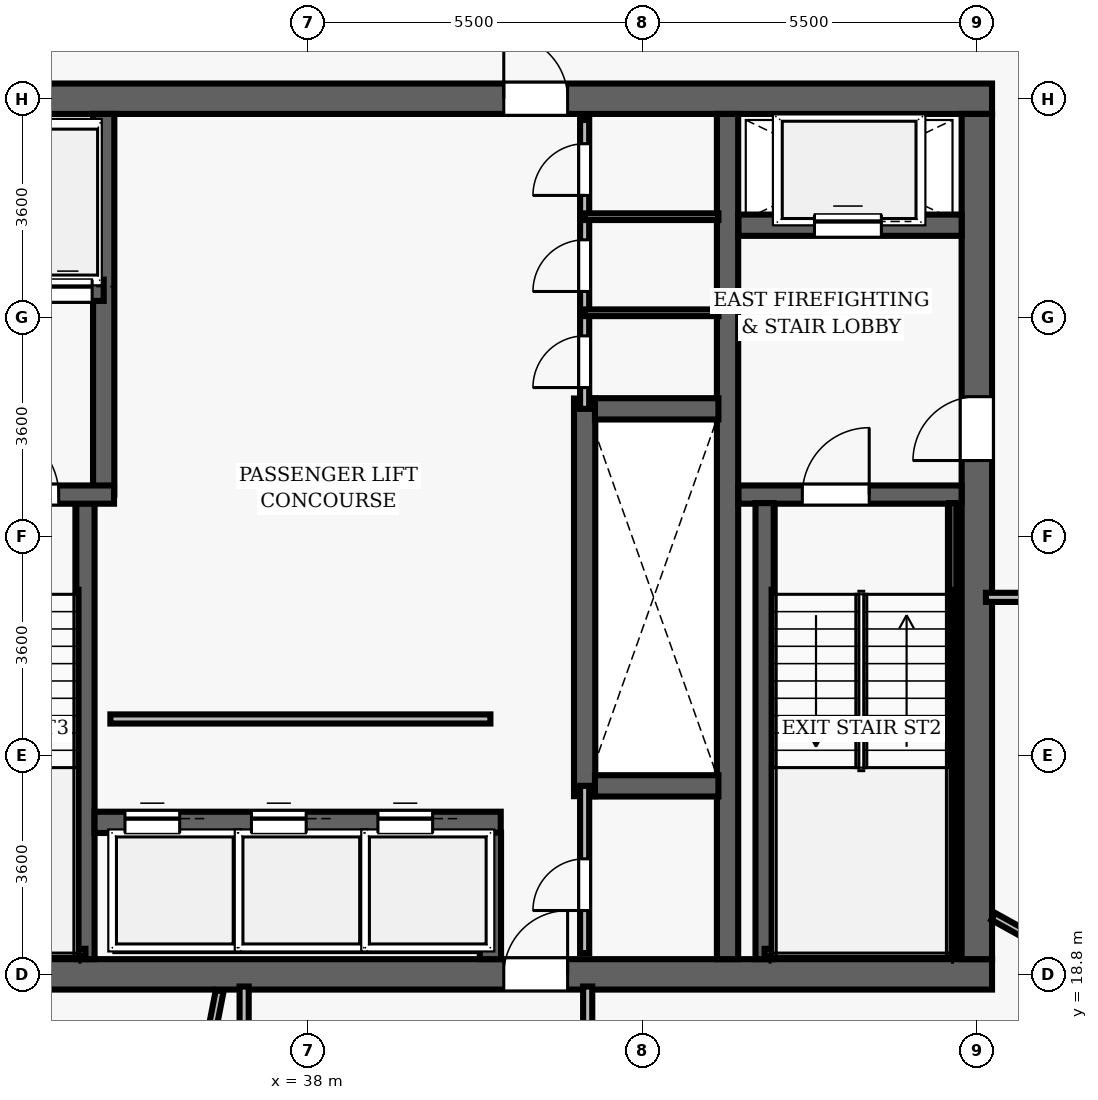
"""IFC4 building model, lengths in metres.
Left out: names, types, materials, properties, quantities, classifications, styles, units other than length and angle.
Written with IfcOpenShell. Run it as: python <this file> out.ifc"""

import sys

from ifc_helpers import new_model, si_unit, direction, frame, frame_2d, origin, place, context, subcontext, project, spatial, rectangle, extrude, element, fill, save


model = new_model("IFC4")
c1 = context("Model", 3, precision=1e-05, world=origin(), true_north=direction((0.0, 1.0)))
c2 = subcontext(c1, "Body", "Model", "MODEL_VIEW")
j1 = project(units=[si_unit("LENGTHUNIT", "METRE"), si_unit("PLANEANGLEUNIT", "RADIAN")], contexts=[c1])
p1 = place(None, origin())
s1 = spatial("IfcSite", under=j1, at=p1, CompositionType="ELEMENT")
p2 = place(p1, origin())
s2 = spatial("IfcBuilding", under=s1, at=p2, CompositionType="ELEMENT")
p3 = place(p2, frame((0.0, 0.0, 209.7)))
s3 = spatial("IfcBuildingStorey", under=s2, at=p3, CompositionType="ELEMENT", Elevation=209.7)
p4 = place(p3, frame((26.75, 18.8, 0.0), z_axis=(0.0, 0.0, 1.0), x_axis=(1.0, 0.0, 0.0)))
e1 = element("IfcWall", 1, at=p4, inside=s3, PredefinedType="SHEAR", context=c2, shape_type="SweptSolid", body=[
    extrude(rectangle(XDim=22.5, YDim=0.5, at=frame_2d((11.25, 0.0))), origin(), (0.0, 0.0, 1.0), 3.85),
])
p5 = place(p4, frame((14.47, 0.0, 0.0)))
e2 = element("IfcOpeningElement", 2, at=p5, cuts=e1, PredefinedType="OPENING", context=c2, shape_type="SweptSolid", body=[
    extrude(rectangle(XDim=1.05, YDim=2.15, at=frame_2d((0.525, 1.075))), frame((0.0, 0.26, 0.0), z_axis=(0.0, -1.0, 0.0), x_axis=(1.0, 0.0, 0.0)), (0.0, 0.0, 1.0), 0.52),
])
p6 = place(p3, frame((26.75, 33.2, 0.0), z_axis=(0.0, 0.0, 1.0), x_axis=(1.0, 0.0, 0.0)))
e3 = element("IfcWall", 3, at=p6, inside=s3, PredefinedType="SHEAR", context=c2, shape_type="SweptSolid", body=[
    extrude(rectangle(XDim=22.5, YDim=0.5, at=frame_2d((11.25, 0.0))), origin(), (0.0, 0.0, 1.0), 3.85),
])
p7 = place(p6, frame((4.57, 0.0, 0.0)))
e4 = element("IfcOpeningElement", 4, at=p7, cuts=e3, PredefinedType="OPENING", context=c2, shape_type="SweptSolid", body=[
    extrude(rectangle(XDim=1.05, YDim=2.15, at=frame_2d((0.525, 1.075))), frame((0.0, 0.26, 0.0), z_axis=(0.0, -1.0, 0.0), x_axis=(1.0, 0.0, 0.0)), (0.0, 0.0, 1.0), 0.52),
])
p8 = place(p6, frame((14.47, 0.0, 0.0)))
e5 = element("IfcOpeningElement", 5, at=p8, cuts=e3, PredefinedType="OPENING", context=c2, shape_type="SweptSolid", body=[
    extrude(rectangle(XDim=1.05, YDim=2.15, at=frame_2d((0.525, 1.075))), frame((0.0, 0.26, 0.0), z_axis=(0.0, -1.0, 0.0), x_axis=(1.0, 0.0, 0.0)), (0.0, 0.0, 1.0), 0.52),
])
p9 = place(p3, frame((49.0, 19.05, 0.0), z_axis=(0.0, 0.0, 1.0), x_axis=(0.0, 1.0, 0.0)))
e6 = element("IfcWall", 6, at=p9, inside=s3, PredefinedType="SHEAR", context=c2, shape_type="SweptSolid", body=[
    extrude(rectangle(XDim=13.9, YDim=0.5, at=frame_2d((6.95, 0.0))), origin(), (0.0, 0.0, 1.0), 3.85),
])
p10 = place(p9, frame((8.2, 0.0, 0.0)))
e7 = element("IfcOpeningElement", 7, at=p10, cuts=e6, PredefinedType="OPENING", context=c2, shape_type="SweptSolid", body=[
    extrude(rectangle(XDim=1.05, YDim=2.15, at=frame_2d((0.525, 1.075))), frame((0.0, 0.26, 0.0), z_axis=(0.0, -1.0, 0.0), x_axis=(1.0, 0.0, 0.0)), (0.0, 0.0, 1.0), 0.52),
])
p11 = place(p3, frame((44.9, 19.05, 0.0), z_axis=(0.0, 0.0, 1.0), x_axis=(0.0, 1.0, 0.0)))
e8 = element("IfcWall", 8, at=p11, inside=s3, PredefinedType="SHEAR", context=c2, shape_type="SweptSolid", body=[
    extrude(rectangle(XDim=13.9, YDim=0.35, at=frame_2d((6.95, 0.0))), origin(), (0.0, 0.0, 1.0), 3.85),
])
p12 = place(p3, frame((45.08, 26.69, 0.0), z_axis=(0.0, 0.0, 1.0), x_axis=(1.0, 0.0, 0.0)))
e9 = element("IfcWall", 9, at=p12, inside=s3, PredefinedType="SHEAR", context=c2, shape_type="SweptSolid", body=[
    extrude(rectangle(XDim=3.67, YDim=0.3, at=frame_2d((1.835, 0.0))), origin(), (0.0, 0.0, 1.0), 3.85),
])
p13 = place(p12, frame((1.05, 0.0, 0.0)))
e10 = element("IfcOpeningElement", 10, at=p13, cuts=e9, PredefinedType="OPENING", context=c2, shape_type="SweptSolid", body=[
    extrude(rectangle(XDim=1.1, YDim=2.15, at=frame_2d((0.55, 1.075))), frame((0.0, 0.16, 0.0), z_axis=(0.0, -1.0, 0.0), x_axis=(1.0, 0.0, 0.0)), (0.0, 0.0, 1.0), 0.32),
])
p14 = place(p3, frame((45.51, 19.05, 0.0), z_axis=(0.0, 0.0, 1.0), x_axis=(0.0, 1.0, 0.0)))
e11 = element("IfcWall", 11, at=p14, inside=s3, PredefinedType="SHEAR", context=c2, shape_type="SweptSolid", body=[
    extrude(rectangle(XDim=7.5, YDim=0.3, at=frame_2d((3.75, 0.0))), origin(), (0.0, 0.0, 1.0), 3.85),
])
p15 = place(p3, frame((48.605, 19.1, 0.0), z_axis=(0.0, 0.0, 1.0), x_axis=(0.0, 1.0, 0.0)))
e12 = element("IfcWall", 12, at=p15, inside=s3, PredefinedType="SHEAR", context=c2, shape_type="SweptSolid", body=[
    extrude(rectangle(XDim=7.45, YDim=0.12, at=frame_2d((3.725, 0.0))), origin(), (0.0, 0.0, 1.0), 3.85),
])
p16 = place(p3, frame((45.51, 19.16, 0.0), z_axis=(0.0, 0.0, 1.0), x_axis=(1.0, 0.0, 0.0)))
e13 = element("IfcWall", 13, at=p16, inside=s3, PredefinedType="SHEAR", context=c2, shape_type="SweptSolid", body=[
    extrude(rectangle(XDim=3.095, YDim=0.12, at=frame_2d((1.547, 0.0))), origin(), (0.0, 0.0, 1.0), 3.85),
])
p17 = place(p3, frame((45.08, 31.12, 0.0), z_axis=(0.0, 0.0, 1.0), x_axis=(1.0, 0.0, 0.0)))
e14 = element("IfcWall", 14, at=p17, inside=s3, PredefinedType="SHEAR", context=c2, shape_type="SweptSolid", body=[
    extrude(rectangle(XDim=3.67, YDim=0.35, at=frame_2d((1.835, 0.0))), origin(), (0.0, 0.0, 1.0), 3.035),
])
p18 = place(p17, frame((1.25, 0.0, 0.0)))
e15 = element("IfcOpeningElement", 15, at=p18, cuts=e14, PredefinedType="OPENING", context=c2, shape_type="SweptSolid", body=[
    extrude(rectangle(XDim=1.1, YDim=2.15, at=frame_2d((0.55, 1.075))), frame((0.0, 0.185, 0.0), z_axis=(0.0, -1.0, 0.0), x_axis=(1.0, 0.0, 0.0)), (0.0, 0.0, 1.0), 0.37),
])
p19 = place(p3, frame((34.34, 19.05, 0.0), z_axis=(0.0, 0.0, 1.0), x_axis=(0.0, 1.0, 0.0)))
e16 = element("IfcWall", 16, at=p19, inside=s3, PredefinedType="SHEAR", context=c2, shape_type="SweptSolid", body=[
    extrude(rectangle(XDim=7.5, YDim=0.3, at=frame_2d((3.75, 0.0))), origin(), (0.0, 0.0, 1.0), 3.85),
])
p20 = place(p3, frame((34.64, 26.69, 0.0), z_axis=(0.0, 0.0, 1.0), x_axis=(0.0, 1.0, 0.0)))
e17 = element("IfcWall", 17, at=p20, inside=s3, PredefinedType="SHEAR", context=c2, shape_type="SweptSolid", body=[
    extrude(rectangle(XDim=6.26, YDim=0.35, at=frame_2d((3.13, 0.0))), origin(), (0.0, 0.0, 1.0), 3.85),
])
p21 = place(p3, frame((31.25, 26.69, 0.0), z_axis=(0.0, 0.0, 1.0), x_axis=(1.0, 0.0, 0.0)))
e18 = element("IfcWall", 18, at=p21, inside=s3, PredefinedType="SHEAR", context=c2, shape_type="SweptSolid", body=[
    extrude(rectangle(XDim=3.56, YDim=0.3, at=frame_2d((1.78, 0.0))), origin(), (0.0, 0.0, 1.0), 3.85),
])
p22 = place(p21, frame((1.55, 0.0, 0.0)))
e19 = element("IfcOpeningElement", 19, at=p22, cuts=e18, PredefinedType="OPENING", context=c2, shape_type="SweptSolid", body=[
    extrude(rectangle(XDim=1.1, YDim=2.15, at=frame_2d((0.55, 1.075))), frame((0.0, 0.16, 0.0), z_axis=(0.0, -1.0, 0.0), x_axis=(1.0, 0.0, 0.0)), (0.0, 0.0, 1.0), 0.32),
])
p23 = place(p3, frame((31.3, 19.16, 0.0), z_axis=(0.0, 0.0, 1.0), x_axis=(1.0, 0.0, 0.0)))
e20 = element("IfcWall", 20, at=p23, inside=s3, PredefinedType="SHEAR", context=c2, shape_type="SweptSolid", body=[
    extrude(rectangle(XDim=3.04, YDim=0.12, at=frame_2d((1.52, 0.0))), origin(), (0.0, 0.0, 1.0), 3.85),
])
p24 = place(p3, frame((32.23, 30.05, 0.0), z_axis=(0.0, 0.0, 1.0), x_axis=(1.0, 0.0, 0.0)))
e21 = element("IfcWall", 21, at=p24, inside=s3, PredefinedType="SHEAR", context=c2, shape_type="SweptSolid", body=[
    extrude(rectangle(XDim=2.41, YDim=0.35, at=frame_2d((1.205, 0.0))), origin(), (0.0, 0.0, 1.0), 3.035),
])
p25 = place(p24, frame((0.42, 0.0, 0.0)))
e22 = element("IfcOpeningElement", 22, at=p25, cuts=e21, PredefinedType="OPENING", context=c2, shape_type="SweptSolid", body=[
    extrude(rectangle(XDim=0.8, YDim=2.15, at=frame_2d((0.4, 1.075))), frame((0.0, 0.185, 0.0), z_axis=(0.0, -1.0, 0.0), x_axis=(1.0, 0.0, 0.0)), (0.0, 0.0, 1.0), 0.37),
])
p26 = place(p24, frame((1.42, 0.0, 0.0)))
e23 = element("IfcOpeningElement", 23, at=p26, cuts=e21, PredefinedType="OPENING", context=c2, shape_type="SweptSolid", body=[
    extrude(rectangle(XDim=0.8, YDim=2.15, at=frame_2d((0.4, 1.075))), frame((0.0, 0.185, 0.0), z_axis=(0.0, -1.0, 0.0), x_axis=(1.0, 0.0, 0.0)), (0.0, 0.0, 1.0), 0.37),
])
p27 = place(p3, frame((42.55, 21.73, 0.0), z_axis=(0.0, 0.0, 1.0), x_axis=(0.0, 1.0, 0.0)))
e24 = element("IfcWall", 24, at=p27, inside=s3, PredefinedType="SHEAR", context=c2, shape_type="SweptSolid", body=[
    extrude(rectangle(XDim=6.54, YDim=0.35, at=frame_2d((3.27, 0.0))), origin(), (0.0, 0.0, 1.0), 3.035),
])
for number, where, z_axis, x_axis in (
    (25, (42.72, 21.9, 0.0), (0.0, 0.0, 1.0), (1.0, 0.0, 0.0)),
    (26, (42.72, 28.1, 0.0), (0.0, 0.0, 1.0), (1.0, 0.0, 0.0)),
):
    element("IfcWall", number, at=place(p3, frame(where, z_axis=z_axis, x_axis=x_axis)), inside=s3, PredefinedType="SHEAR", context=c2, shape_type="SweptSolid", body=[
        extrude(rectangle(XDim=2.03, YDim=0.35, at=frame_2d((1.015, 0.0))), origin(), (0.0, 0.0, 1.0), 3.035),
    ])
p28 = place(p3, frame((34.49, 21.3, 0.0), z_axis=(0.0, 0.0, 1.0), x_axis=(1.0, 0.0, 0.0)))
e27 = element("IfcWall", 27, at=p28, inside=s3, PredefinedType="SHEAR", context=c2, shape_type="SweptSolid", body=[
    extrude(rectangle(XDim=6.68, YDim=0.35, at=frame_2d((3.34, 0.0))), origin(), (0.0, 0.0, 1.0), 3.035),
])
p29 = place(p28, frame((0.5, 0.0, 0.0)))
e28 = element("IfcOpeningElement", 28, at=p29, cuts=e27, PredefinedType="OPENING", context=c2, shape_type="SweptSolid", body=[
    extrude(rectangle(XDim=0.9, YDim=2.15, at=frame_2d((0.45, 1.075))), frame((0.0, 0.185, 0.0), z_axis=(0.0, -1.0, 0.0), x_axis=(1.0, 0.0, 0.0)), (0.0, 0.0, 1.0), 0.37),
])
p30 = place(p28, frame((2.58, 0.0, 0.0)))
e29 = element("IfcOpeningElement", 29, at=p30, cuts=e27, PredefinedType="OPENING", context=c2, shape_type="SweptSolid", body=[
    extrude(rectangle(XDim=0.9, YDim=2.15, at=frame_2d((0.45, 1.075))), frame((0.0, 0.185, 0.0), z_axis=(0.0, -1.0, 0.0), x_axis=(1.0, 0.0, 0.0)), (0.0, 0.0, 1.0), 0.37),
])
p31 = place(p28, frame((4.66, 0.0, 0.0)))
e30 = element("IfcOpeningElement", 30, at=p31, cuts=e27, PredefinedType="OPENING", context=c2, shape_type="SweptSolid", body=[
    extrude(rectangle(XDim=0.9, YDim=2.15, at=frame_2d((0.45, 1.075))), frame((0.0, 0.185, 0.0), z_axis=(0.0, -1.0, 0.0), x_axis=(1.0, 0.0, 0.0)), (0.0, 0.0, 1.0), 0.37),
])
p32 = place(p3, frame((41.0, 19.05, 0.0), z_axis=(0.0, 0.0, 1.0), x_axis=(0.0, 1.0, 0.0)))
e31 = element("IfcWall", 31, at=p32, inside=s3, PredefinedType="SHEAR", context=c2, shape_type="SweptSolid", body=[
    extrude(rectangle(XDim=2.08, YDim=0.35, at=frame_2d((1.04, 0.0))), origin(), (0.0, 0.0, 1.0), 3.035),
])
p33 = place(p3, frame((34.75, 23.0, 0.0), z_axis=(0.0, 0.0, 1.0), x_axis=(1.0, 0.0, 0.0)))
e32 = element("IfcWall", 32, at=p33, inside=s3, PredefinedType="PARTITIONING", context=c2, shape_type="SweptSolid", body=[
    extrude(rectangle(XDim=6.25, YDim=0.15, at=frame_2d((3.125, 0.0))), origin(), (0.0, 0.0, 1.0), 3.035),
])
p34 = place(p3, frame((42.55, 28.1, 0.0), z_axis=(0.0, 0.0, 1.0), x_axis=(0.0, 1.0, 0.0)))
e33 = element("IfcWall", 33, at=p34, inside=s3, PredefinedType="PARTITIONING", context=c2, shape_type="SweptSolid", body=[
    extrude(rectangle(XDim=4.75, YDim=0.15, at=frame_2d((2.375, 0.0))), origin(), (0.0, 0.0, 1.0), 3.035),
])
p35 = place(p34, frame((0.35, 0.0, 0.0)))
e34 = element("IfcOpeningElement", 34, at=p35, cuts=e33, PredefinedType="OPENING", context=c2, shape_type="SweptSolid", body=[
    extrude(rectangle(XDim=0.85, YDim=2.1, at=frame_2d((0.425, 1.05))), frame((0.0, 0.085, 0.0), z_axis=(0.0, -1.0, 0.0), x_axis=(1.0, 0.0, 0.0)), (0.0, 0.0, 1.0), 0.17),
])
p36 = place(p34, frame((1.93, 0.0, 0.0)))
e35 = element("IfcOpeningElement", 35, at=p36, cuts=e33, PredefinedType="OPENING", context=c2, shape_type="SweptSolid", body=[
    extrude(rectangle(XDim=0.85, YDim=2.1, at=frame_2d((0.425, 1.05))), frame((0.0, 0.085, 0.0), z_axis=(0.0, -1.0, 0.0), x_axis=(1.0, 0.0, 0.0)), (0.0, 0.0, 1.0), 0.17),
])
p37 = place(p34, frame((3.51, 0.0, 0.0)))
e36 = element("IfcOpeningElement", 36, at=p37, cuts=e33, PredefinedType="OPENING", context=c2, shape_type="SweptSolid", body=[
    extrude(rectangle(XDim=0.85, YDim=2.1, at=frame_2d((0.425, 1.05))), frame((0.0, 0.085, 0.0), z_axis=(0.0, -1.0, 0.0), x_axis=(1.0, 0.0, 0.0)), (0.0, 0.0, 1.0), 0.17),
])
for number, where, z_axis, x_axis in (
    (37, (42.55, 29.68, 0.0), (0.0, 0.0, 1.0), (1.0, 0.0, 0.0)),
    (38, (42.55, 31.26, 0.0), (0.0, 0.0, 1.0), (1.0, 0.0, 0.0)),
):
    element("IfcWall", number, at=place(p3, frame(where, z_axis=z_axis, x_axis=x_axis)), inside=s3, PredefinedType="PARTITIONING", context=c2, shape_type="SweptSolid", body=[
        extrude(rectangle(XDim=2.2, YDim=0.11, at=frame_2d((1.1, 0.0))), origin(), (0.0, 0.0, 1.0), 3.035),
    ])
p38 = place(p3, frame((42.55, 19.15, 0.0), z_axis=(0.0, 0.0, 1.0), x_axis=(0.0, 1.0, 0.0)))
e39 = element("IfcWall", 39, at=p38, inside=s3, PredefinedType="PARTITIONING", context=c2, shape_type="SweptSolid", body=[
    extrude(rectangle(XDim=2.75, YDim=0.15, at=frame_2d((1.375, 0.0))), origin(), (0.0, 0.0, 1.0), 3.035),
])
p39 = place(p38, frame((0.7, 0.0, 0.0)))
e40 = element("IfcOpeningElement", 40, at=p39, cuts=e39, PredefinedType="OPENING", context=c2, shape_type="SweptSolid", body=[
    extrude(rectangle(XDim=0.85, YDim=2.1, at=frame_2d((0.425, 1.05))), frame((0.0, 0.085, 0.0), z_axis=(0.0, -1.0, 0.0), x_axis=(1.0, 0.0, 0.0)), (0.0, 0.0, 1.0), 0.17),
])
p40 = place(p3, frame((49.15, 25.0, 0.0), z_axis=(0.0, 0.0, 1.0), x_axis=(1.0, 0.0, 0.0)))
e41 = element("IfcWall", 41, at=p40, inside=s3, PredefinedType="PARTITIONING", context=c2, shape_type="SweptSolid", body=[
    extrude(rectangle(XDim=8.973, YDim=0.15, at=frame_2d((4.487, 0.0))), origin(), (0.0, 0.0, 1.0), 3.035),
])
p41 = place(p40, frame((1.493, 0.0, 0.0)))
e42 = element("IfcOpeningElement", 42, at=p41, cuts=e41, PredefinedType="OPENING", context=c2, shape_type="SweptSolid", body=[
    extrude(rectangle(XDim=1.5, YDim=2.2, at=frame_2d((0.75, 1.1))), frame((0.0, 0.085, 0.0), z_axis=(0.0, -1.0, 0.0), x_axis=(1.0, 0.0, 0.0)), (0.0, 0.0, 1.0), 0.17),
])
p42 = place(p3, frame((36.95, 11.2, 0.0), z_axis=(0.0, 0.0, 1.0), x_axis=(0.0, 1.0, 0.0)))
e43 = element("IfcWall", 43, at=p42, inside=s3, PredefinedType="PARTITIONING", context=c2, shape_type="SweptSolid", body=[
    extrude(rectangle(XDim=7.4, YDim=0.15, at=frame_2d((3.7, 0.0))), origin(), (0.0, 0.0, 1.0), 3.035),
])
p43 = place(p3, frame((42.6, 16.65, 0.0), z_axis=(0.0, 0.0, 1.0), x_axis=(0.0, 1.0, 0.0)))
e44 = element("IfcWall", 44, at=p43, inside=s3, PredefinedType="PARTITIONING", context=c2, shape_type="SweptSolid", body=[
    extrude(rectangle(XDim=1.95, YDim=0.15, at=frame_2d((0.975, 0.0))), origin(), (0.0, 0.0, 1.0), 3.035),
])
p44 = place(p3, frame((36.548, 18.53, 0.0), z_axis=(0.0, 0.0, 1.0), x_axis=(-0.190821746149, -0.981624704863, 0.0)))
e45 = element("IfcWall", 45, at=p44, inside=s3, PredefinedType="PARTITIONING", context=c2, shape_type="SweptSolid", body=[
    extrude(rectangle(XDim=14.321, YDim=0.13, at=frame_2d((7.16, 0.0))), origin(), (0.0, 0.0, 1.0), 3.035),
])
p45 = place(p3, frame((49.27, 19.753, 0.0), z_axis=(0.0, 0.0, 1.0), x_axis=(0.874615259577, -0.484817643775, 0.0)))
e46 = element("IfcWall", 46, at=p45, inside=s3, PredefinedType="PARTITIONING", context=c2, shape_type="SweptSolid", body=[
    extrude(rectangle(XDim=12.235, YDim=0.13, at=frame_2d((6.118, 0.0))), origin(), (0.0, 0.0, 1.0), 3.035),
])
p46 = place(p13, origin())
e47 = element("IfcDoor", 47, at=p46, inside=s3, OperationType="SINGLE_SWING_RIGHT", PredefinedType="DOOR", context=c2, shape_type="SweptSolid", body=[
    extrude(rectangle(XDim=1.1, YDim=2.15, at=frame_2d((0.55, 1.075))), frame((0.0, 0.025, 0.0), z_axis=(0.0, -1.0, 0.0), x_axis=(1.0, 0.0, 0.0)), (0.0, 0.0, 1.0), 0.05),
])
fill(e10, e47)
p47 = place(p10, origin())
e48 = element("IfcDoor", 48, at=p47, inside=s3, OperationType="SINGLE_SWING_LEFT", PredefinedType="DOOR", context=c2, shape_type="SweptSolid", body=[
    extrude(rectangle(XDim=1.05, YDim=2.15, at=frame_2d((0.525, 1.075))), frame((0.0, 0.025, 0.0), z_axis=(0.0, -1.0, 0.0), x_axis=(1.0, 0.0, 0.0)), (0.0, 0.0, 1.0), 0.05),
])
fill(e7, e48)
p48 = place(p22, origin())
e49 = element("IfcDoor", 49, at=p48, inside=s3, OperationType="SINGLE_SWING_LEFT", PredefinedType="DOOR", context=c2, shape_type="SweptSolid", body=[
    extrude(rectangle(XDim=1.1, YDim=2.15, at=frame_2d((0.55, 1.075))), frame((0.0, 0.025, 0.0), z_axis=(0.0, -1.0, 0.0), x_axis=(1.0, 0.0, 0.0)), (0.0, 0.0, 1.0), 0.05),
])
fill(e19, e49)
p49 = place(p8, origin())
e50 = element("IfcDoor", 50, at=p49, inside=s3, OperationType="SINGLE_SWING_LEFT", PredefinedType="DOOR", context=c2, shape_type="SweptSolid", body=[
    extrude(rectangle(XDim=1.05, YDim=2.15, at=frame_2d((0.525, 1.075))), frame((0.0, 0.025, 0.0), z_axis=(0.0, -1.0, 0.0), x_axis=(1.0, 0.0, 0.0)), (0.0, 0.0, 1.0), 0.05),
])
fill(e5, e50)
p50 = place(p5, origin())
e51 = element("IfcDoor", 51, at=p50, inside=s3, OperationType="SINGLE_SWING_RIGHT", PredefinedType="DOOR", context=c2, shape_type="SweptSolid", body=[
    extrude(rectangle(XDim=1.05, YDim=2.15, at=frame_2d((0.525, 1.075))), frame((0.0, 0.025, 0.0), z_axis=(0.0, -1.0, 0.0), x_axis=(1.0, 0.0, 0.0)), (0.0, 0.0, 1.0), 0.05),
])
fill(e2, e51)
p51 = place(p35, origin())
e52 = element("IfcDoor", 52, at=p51, inside=s3, OperationType="SINGLE_SWING_LEFT", PredefinedType="DOOR", context=c2, shape_type="SweptSolid", body=[
    extrude(rectangle(XDim=0.85, YDim=2.1, at=frame_2d((0.425, 1.05))), frame((0.0, 0.025, 0.0), z_axis=(0.0, -1.0, 0.0), x_axis=(1.0, 0.0, 0.0)), (0.0, 0.0, 1.0), 0.05),
])
fill(e34, e52)
p52 = place(p36, origin())
e53 = element("IfcDoor", 53, at=p52, inside=s3, OperationType="SINGLE_SWING_LEFT", PredefinedType="DOOR", context=c2, shape_type="SweptSolid", body=[
    extrude(rectangle(XDim=0.85, YDim=2.1, at=frame_2d((0.425, 1.05))), frame((0.0, 0.025, 0.0), z_axis=(0.0, -1.0, 0.0), x_axis=(1.0, 0.0, 0.0)), (0.0, 0.0, 1.0), 0.05),
])
fill(e35, e53)
p53 = place(p37, origin())
e54 = element("IfcDoor", 54, at=p53, inside=s3, OperationType="SINGLE_SWING_LEFT", PredefinedType="DOOR", context=c2, shape_type="SweptSolid", body=[
    extrude(rectangle(XDim=0.85, YDim=2.1, at=frame_2d((0.425, 1.05))), frame((0.0, 0.025, 0.0), z_axis=(0.0, -1.0, 0.0), x_axis=(1.0, 0.0, 0.0)), (0.0, 0.0, 1.0), 0.05),
])
fill(e36, e54)
p54 = place(p39, origin())
e55 = element("IfcDoor", 55, at=p54, inside=s3, OperationType="SINGLE_SWING_LEFT", PredefinedType="DOOR", context=c2, shape_type="SweptSolid", body=[
    extrude(rectangle(XDim=0.85, YDim=2.1, at=frame_2d((0.425, 1.05))), frame((0.0, 0.025, 0.0), z_axis=(0.0, -1.0, 0.0), x_axis=(1.0, 0.0, 0.0)), (0.0, 0.0, 1.0), 0.05),
])
fill(e40, e55)
p55 = place(p29, origin())
e56 = element("IfcDoor", 56, at=p55, inside=s3, OperationType="SLIDING_TO_LEFT", PredefinedType="DOOR", context=c2, shape_type="SweptSolid", body=[
    extrude(rectangle(XDim=0.9, YDim=2.15, at=frame_2d((0.45, 1.075))), frame((0.0, 0.025, 0.0), z_axis=(0.0, -1.0, 0.0), x_axis=(1.0, 0.0, 0.0)), (0.0, 0.0, 1.0), 0.05),
])
fill(e28, e56)
p56 = place(p30, origin())
e57 = element("IfcDoor", 57, at=p56, inside=s3, OperationType="SLIDING_TO_LEFT", PredefinedType="DOOR", context=c2, shape_type="SweptSolid", body=[
    extrude(rectangle(XDim=0.9, YDim=2.15, at=frame_2d((0.45, 1.075))), frame((0.0, 0.025, 0.0), z_axis=(0.0, -1.0, 0.0), x_axis=(1.0, 0.0, 0.0)), (0.0, 0.0, 1.0), 0.05),
])
fill(e29, e57)
p57 = place(p31, origin())
e58 = element("IfcDoor", 58, at=p57, inside=s3, OperationType="SLIDING_TO_LEFT", PredefinedType="DOOR", context=c2, shape_type="SweptSolid", body=[
    extrude(rectangle(XDim=0.9, YDim=2.15, at=frame_2d((0.45, 1.075))), frame((0.0, 0.025, 0.0), z_axis=(0.0, -1.0, 0.0), x_axis=(1.0, 0.0, 0.0)), (0.0, 0.0, 1.0), 0.05),
])
fill(e30, e58)
p58 = place(p18, origin())
e59 = element("IfcDoor", 59, at=p58, inside=s3, OperationType="SLIDING_TO_LEFT", PredefinedType="DOOR", context=c2, shape_type="SweptSolid", body=[
    extrude(rectangle(XDim=1.1, YDim=2.15, at=frame_2d((0.55, 1.075))), frame((0.0, 0.025, 0.0), z_axis=(0.0, -1.0, 0.0), x_axis=(1.0, 0.0, 0.0)), (0.0, 0.0, 1.0), 0.05),
])
fill(e15, e59)
p59 = place(p26, origin())
e60 = element("IfcDoor", 60, at=p59, inside=s3, OperationType="SLIDING_TO_LEFT", PredefinedType="DOOR", context=c2, shape_type="SweptSolid", body=[
    extrude(rectangle(XDim=0.8, YDim=2.15, at=frame_2d((0.4, 1.075))), frame((0.0, 0.025, 0.0), z_axis=(0.0, -1.0, 0.0), x_axis=(1.0, 0.0, 0.0)), (0.0, 0.0, 1.0), 0.05),
])
fill(e23, e60)
save(model, sys.argv[1])
